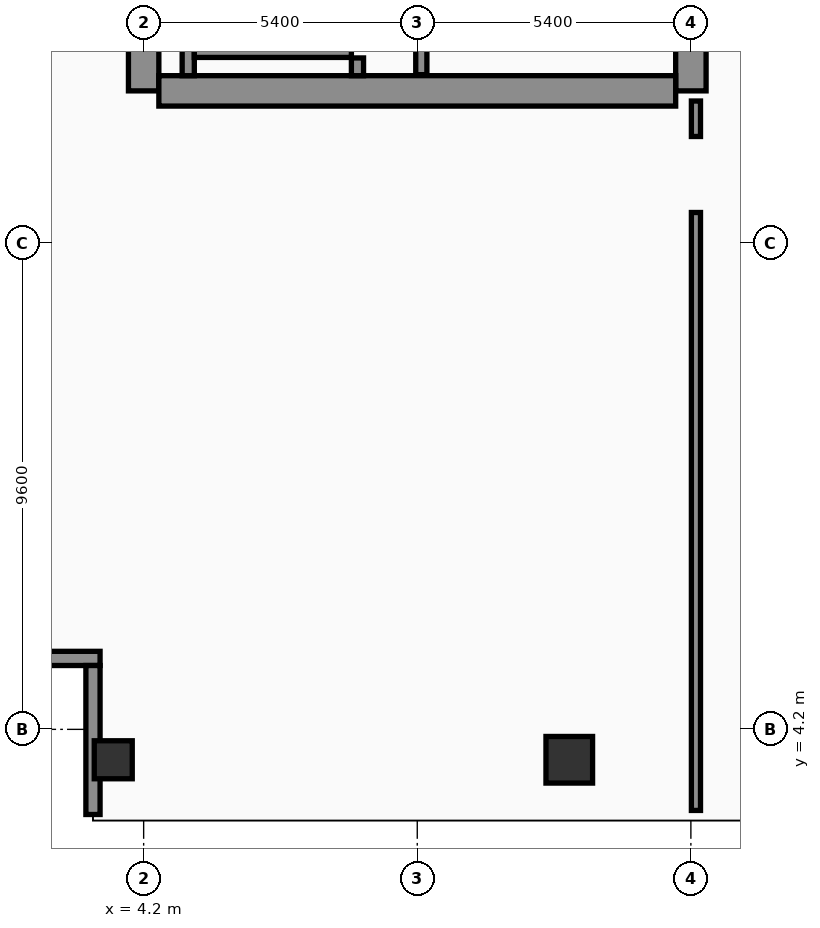
"""IFC4 building model, lengths in metres.
Left out: names, types, materials, properties, quantities, classifications, styles, units other than length and angle.
Written with IfcOpenShell. Run it as: python <this file> out.ifc"""

import sys

from ifc_helpers import new_model, si_unit, direction, frame, frame_2d, origin, origin_2d, place, context, subcontext, project, spatial, rectangle, hollow_rectangle, extrude, element, fill, save


model = new_model("IFC4")
c1 = context("Model", 3, precision=1e-05, world=origin(), true_north=direction((0.0, 1.0)))
c2 = subcontext(c1, "Body", "Model", "MODEL_VIEW")
j1 = project(units=[si_unit("LENGTHUNIT", "METRE"), si_unit("PLANEANGLEUNIT", "RADIAN")], contexts=[c1])
p1 = place(None, origin())
s1 = spatial("IfcSite", under=j1, at=p1, CompositionType="ELEMENT")
p2 = place(p1, origin())
s2 = spatial("IfcBuilding", under=s1, at=p2, CompositionType="ELEMENT")
p3 = place(p2, frame((0.0, 0.0, 307.0)))
s3 = spatial("IfcBuildingStorey", under=s2, at=p3, CompositionType="ELEMENT", Elevation=307.0)
p4 = place(p3, frame((4.2, 16.8, 0.0), z_axis=(0.0, 0.0, 1.0), x_axis=(0.0, 1.0, 0.0)))
e1 = element("IfcWall", 1, at=p4, inside=s3, PredefinedType="SHEAR", context=c2, shape_type="SweptSolid", body=[
    extrude(rectangle(XDim=21.6, YDim=0.6, at=frame_2d((10.8, 0.0))), origin(), (0.0, 0.0, 1.0), 4.26),
])
p5 = place(p3, frame((15.0, 16.8, 0.0), z_axis=(0.0, 0.0, 1.0), x_axis=(0.0, 1.0, 0.0)))
e2 = element("IfcWall", 2, at=p5, inside=s3, PredefinedType="SHEAR", context=c2, shape_type="SweptSolid", body=[
    extrude(rectangle(XDim=21.6, YDim=0.6, at=frame_2d((10.8, 0.0))), origin(), (0.0, 0.0, 1.0), 4.26),
])
p6 = place(p5, frame((8.65, 0.0, 0.0)))
e3 = element("IfcOpeningElement", 3, at=p6, cuts=e2, PredefinedType="OPENING", context=c2, shape_type="SweptSolid", body=[
    extrude(rectangle(XDim=1.1, YDim=2.2, at=frame_2d((0.55, 1.1))), frame((0.0, 0.31, 0.0), z_axis=(0.0, -1.0, 0.0), x_axis=(1.0, 0.0, 0.0)), (0.0, 0.0, 1.0), 0.62),
])
p7 = place(p5, frame((18.9, 0.0, 0.0)))
e4 = element("IfcOpeningElement", 4, at=p7, cuts=e2, PredefinedType="OPENING", context=c2, shape_type="SweptSolid", body=[
    extrude(rectangle(XDim=1.1, YDim=2.2, at=frame_2d((0.55, 1.1))), frame((0.0, 0.31, 0.0), z_axis=(0.0, -1.0, 0.0), x_axis=(1.0, 0.0, 0.0)), (0.0, 0.0, 1.0), 0.62),
])
p8 = place(p3, frame((4.5, 16.8, 0.0), z_axis=(0.0, 0.0, 1.0), x_axis=(1.0, 0.0, 0.0)))
e5 = element("IfcWall", 5, at=p8, inside=s3, PredefinedType="SHEAR", context=c2, shape_type="SweptSolid", body=[
    extrude(rectangle(XDim=10.2, YDim=0.6, at=frame_2d((5.1, 0.0))), origin(), (0.0, 0.0, 1.0), 4.26),
])
p9 = place(p3, frame((5.08, 17.1, 0.0), z_axis=(0.0, 0.0, 1.0), x_axis=(0.0, 1.0, 0.0)))
e6 = element("IfcWall", 6, at=p9, inside=s3, PredefinedType="SOLIDWALL", context=c2, shape_type="SweptSolid", body=[
    extrude(rectangle(XDim=9.69, YDim=0.24, at=frame_2d((4.845, 0.0))), origin(), (0.0, 0.0, 1.0), 4.26),
])
p10 = place(p3, frame((8.42, 17.1, 0.0), z_axis=(0.0, 0.0, 1.0), x_axis=(0.0, 1.0, 0.0)))
e7 = element("IfcWall", 7, at=p10, inside=s3, PredefinedType="SOLIDWALL", context=c2, shape_type="SweptSolid", body=[
    extrude(rectangle(XDim=9.69, YDim=0.24, at=frame_2d((4.845, 0.0))), origin(), (0.0, 0.0, 1.0), 4.26),
])
p11 = place(p10, frame((0.35, 0.0, 0.0)))
e8 = element("IfcOpeningElement", 8, at=p11, cuts=e7, PredefinedType="OPENING", context=c2, shape_type="SweptSolid", body=[
    extrude(rectangle(XDim=1.15, YDim=2.2, at=frame_2d((0.575, 1.1))), frame((0.0, 0.13, 0.0), z_axis=(0.0, -1.0, 0.0), x_axis=(1.0, 0.0, 0.0)), (0.0, 0.0, 1.0), 0.26),
])
p12 = place(p3, frame((5.2, 17.58, 0.0), z_axis=(0.0, 0.0, 1.0), x_axis=(1.0, 0.0, 0.0)))
e9 = element("IfcWall", 9, at=p12, inside=s3, PredefinedType="SOLIDWALL", context=c2, shape_type="SweptSolid", body=[
    extrude(rectangle(XDim=3.1, YDim=0.24, at=frame_2d((1.55, 0.0))), origin(), (0.0, 0.0, 1.0), 4.26),
])
p13 = place(p3, frame((3.6, 3.6, 0.0), z_axis=(0.0, 0.0, 1.0), x_axis=(1.0, 0.0, 0.0)))
e10 = element("IfcColumn", 10, at=p13, inside=s3, PredefinedType="COLUMN", context=c2, shape_type="SweptSolid", body=[
    extrude(hollow_rectangle(XDim=0.75, YDim=0.75, WallThickness=0.032, at=origin_2d()), origin(), (0.0, 0.0, 1.0), 4.26),
])
p14 = place(p3, frame((12.6, 3.6, 0.0), z_axis=(0.0, 0.0, 1.0), x_axis=(1.0, 0.0, 0.0)))
e11 = element("IfcColumn", 11, at=p14, inside=s3, PredefinedType="COLUMN", context=c2, shape_type="SweptSolid", body=[
    extrude(rectangle(XDim=0.92, YDim=0.92, at=origin_2d()), origin(), (0.0, 0.0, 1.0), 4.26),
])
p15 = place(p3, frame((0.12, 5.6, 0.0), z_axis=(0.0, 0.0, 1.0), x_axis=(1.0, 0.0, 0.0)))
e12 = element("IfcWall", 12, at=p15, inside=s3, PredefinedType="SOLIDWALL", context=c2, shape_type="SweptSolid", body=[
    extrude(rectangle(XDim=3.22, YDim=0.28, at=frame_2d((1.61, 0.0))), origin(), (0.0, 0.0, 1.0), 3.69),
])
p16 = place(p3, frame((3.2, 5.46, 0.0), z_axis=(0.0, 0.0, 1.0), x_axis=(0.0, -1.0, 0.0)))
e13 = element("IfcWall", 13, at=p16, inside=s3, PredefinedType="SOLIDWALL", context=c2, shape_type="SweptSolid", body=[
    extrude(rectangle(XDim=2.94, YDim=0.28, at=frame_2d((1.47, 0.0))), origin(), (0.0, 0.0, 1.0), 3.69),
])
p17 = place(p3, frame((9.68, 17.12, 0.0), z_axis=(0.0, 0.0, 1.0), x_axis=(0.0, 1.0, 0.0)))
e14 = element("IfcWall", 14, at=p17, inside=s3, PredefinedType="SOLIDWALL", context=c2, shape_type="SweptSolid", body=[
    extrude(rectangle(XDim=7.88, YDim=0.22, at=frame_2d((3.94, 0.0))), origin(), (0.0, 0.0, 1.0), 4.26),
])
p18 = place(p3, frame((15.1, 2.6, 0.0), z_axis=(0.0, 0.0, 1.0), x_axis=(0.0, 1.0, 0.0)))
e15 = element("IfcWall", 15, at=p18, inside=s3, PredefinedType="PARTITIONING", context=c2, shape_type="SweptSolid", body=[
    extrude(rectangle(XDim=14.0, YDim=0.18, at=frame_2d((7.0, 0.0))), origin(), (0.0, 0.0, 1.0), 3.29),
])
p19 = place(p18, frame((11.8, 0.0, 0.0)))
e16 = element("IfcOpeningElement", 16, at=p19, cuts=e15, PredefinedType="OPENING", context=c2, shape_type="SweptSolid", body=[
    extrude(rectangle(XDim=1.5, YDim=2.22, at=frame_2d((0.75, 1.11))), frame((0.0, 0.1, 0.0), z_axis=(0.0, -1.0, 0.0), x_axis=(1.0, 0.0, 0.0)), (0.0, 0.0, 1.0), 0.2),
])
p20 = place(p19, origin())
e17 = element("IfcDoor", 17, at=p20, inside=s3, OperationType="SINGLE_SWING_LEFT", PredefinedType="DOOR", context=c2, shape_type="SweptSolid", body=[
    extrude(rectangle(XDim=1.5, YDim=2.22, at=frame_2d((0.75, 1.11))), frame((0.0, 0.025, 0.0), z_axis=(0.0, -1.0, 0.0), x_axis=(1.0, 0.0, 0.0)), (0.0, 0.0, 1.0), 0.05),
])
fill(e16, e17)
p21 = place(p11, origin())
e18 = element("IfcDoor", 18, at=p21, inside=s3, OperationType="SINGLE_SWING_LEFT", PredefinedType="DOOR", context=c2, shape_type="SweptSolid", body=[
    extrude(rectangle(XDim=1.15, YDim=2.2, at=frame_2d((0.575, 1.1))), frame((0.0, 0.025, 0.0), z_axis=(0.0, -1.0, 0.0), x_axis=(1.0, 0.0, 0.0)), (0.0, 0.0, 1.0), 0.05),
])
fill(e8, e18)
save(model, sys.argv[1])
